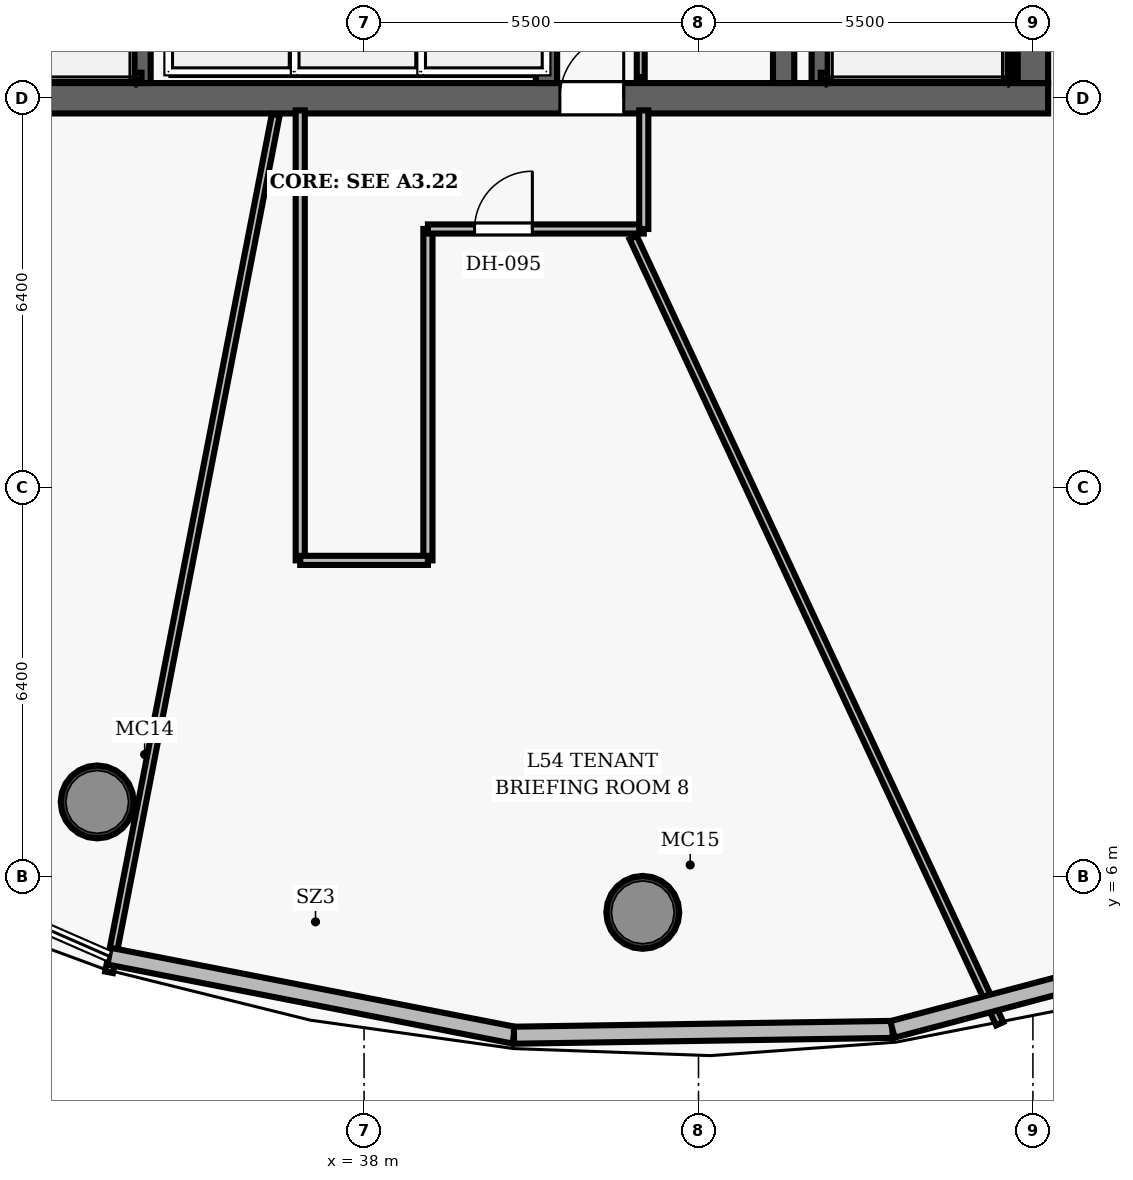
"""IFC4 building model, lengths in metres.
Left out: names, types, materials, properties, quantities, classifications, styles, units other than length and angle.
Written with IfcOpenShell. Run it as: python <this file> out.ifc"""

import sys

from ifc_helpers import new_model, si_unit, direction, frame, frame_2d, origin, origin_2d, place, context, subcontext, project, spatial, rectangle, hollow_circle, extrude, element, fill, save


model = new_model("IFC4")
c1 = context("Model", 3, precision=1e-05, world=origin(), true_north=direction((0.0, 1.0)))
c2 = subcontext(c1, "Body", "Model", "MODEL_VIEW")
j1 = project(units=[si_unit("LENGTHUNIT", "METRE"), si_unit("PLANEANGLEUNIT", "RADIAN")], contexts=[c1])
p1 = place(None, origin())
s1 = spatial("IfcSite", under=j1, at=p1, CompositionType="ELEMENT")
p2 = place(p1, origin())
s2 = spatial("IfcBuilding", under=s1, at=p2, CompositionType="ELEMENT")
p3 = place(p2, frame((0.0, 0.0, 213.55)))
s3 = spatial("IfcBuildingStorey", under=s2, at=p3, CompositionType="ELEMENT", Elevation=213.55)
p4 = place(p3, frame((26.75, 18.8, 0.0), z_axis=(0.0, 0.0, 1.0), x_axis=(1.0, 0.0, 0.0)))
e1 = element("IfcWall", 1, at=p4, inside=s3, PredefinedType="SHEAR", context=c2, shape_type="SweptSolid", body=[
    extrude(rectangle(XDim=22.5, YDim=0.5, at=frame_2d((11.25, 0.0))), origin(), (0.0, 0.0, 1.0), 3.85),
])
p5 = place(p4, frame((14.47, 0.0, 0.0)))
e2 = element("IfcOpeningElement", 2, at=p5, cuts=e1, PredefinedType="OPENING", context=c2, shape_type="SweptSolid", body=[
    extrude(rectangle(XDim=1.05, YDim=2.15, at=frame_2d((0.525, 1.075))), frame((0.0, 0.26, 0.0), z_axis=(0.0, -1.0, 0.0), x_axis=(1.0, 0.0, 0.0)), (0.0, 0.0, 1.0), 0.52),
])
p6 = place(p3, frame((49.0, 19.05, 0.0), z_axis=(0.0, 0.0, 1.0), x_axis=(0.0, 1.0, 0.0)))
e3 = element("IfcWall", 3, at=p6, inside=s3, PredefinedType="SHEAR", context=c2, shape_type="SweptSolid", body=[
    extrude(rectangle(XDim=13.9, YDim=0.5, at=frame_2d((6.95, 0.0))), origin(), (0.0, 0.0, 1.0), 3.85),
])
p7 = place(p6, frame((8.2, 0.0, 0.0)))
e4 = element("IfcOpeningElement", 4, at=p7, cuts=e3, PredefinedType="OPENING", context=c2, shape_type="SweptSolid", body=[
    extrude(rectangle(XDim=1.05, YDim=2.15, at=frame_2d((0.525, 1.075))), frame((0.0, 0.26, 0.0), z_axis=(0.0, -1.0, 0.0), x_axis=(1.0, 0.0, 0.0)), (0.0, 0.0, 1.0), 0.52),
])
p8 = place(p3, frame((44.9, 19.05, 0.0), z_axis=(0.0, 0.0, 1.0), x_axis=(0.0, 1.0, 0.0)))
e5 = element("IfcWall", 5, at=p8, inside=s3, PredefinedType="SHEAR", context=c2, shape_type="SweptSolid", body=[
    extrude(rectangle(XDim=13.9, YDim=0.35, at=frame_2d((6.95, 0.0))), origin(), (0.0, 0.0, 1.0), 3.85),
])
for number, where, z_axis, x_axis in (
    (6, (33.611, 7.228, 0.0), (0.0, 0.0, 1.0), (1.0, 0.0, 0.0)),
    (7, (42.584, 5.412, 0.0), (0.0, 0.0, 1.0), (1.0, 0.0, 0.0)),
):
    element("IfcColumn", number, at=place(p3, frame(where, z_axis=z_axis, x_axis=x_axis)), inside=s3, PredefinedType="COLUMN", context=c2, shape_type="SweptSolid", body=[
        extrude(hollow_circle(Radius=0.6, WallThickness=0.05, at=origin_2d()), origin(), (0.0, 0.0, 1.0), 3.85),
    ])
p9 = place(p3, frame((45.51, 19.05, 0.0), z_axis=(0.0, 0.0, 1.0), x_axis=(0.0, 1.0, 0.0)))
e8 = element("IfcWall", 8, at=p9, inside=s3, PredefinedType="SHEAR", context=c2, shape_type="SweptSolid", body=[
    extrude(rectangle(XDim=7.5, YDim=0.3, at=frame_2d((3.75, 0.0))), origin(), (0.0, 0.0, 1.0), 3.85),
])
p10 = place(p3, frame((48.605, 19.1, 0.0), z_axis=(0.0, 0.0, 1.0), x_axis=(0.0, 1.0, 0.0)))
e9 = element("IfcWall", 9, at=p10, inside=s3, PredefinedType="SHEAR", context=c2, shape_type="SweptSolid", body=[
    extrude(rectangle(XDim=7.45, YDim=0.12, at=frame_2d((3.725, 0.0))), origin(), (0.0, 0.0, 1.0), 3.85),
])
p11 = place(p3, frame((45.51, 19.16, 0.0), z_axis=(0.0, 0.0, 1.0), x_axis=(1.0, 0.0, 0.0)))
e10 = element("IfcWall", 10, at=p11, inside=s3, PredefinedType="SHEAR", context=c2, shape_type="SweptSolid", body=[
    extrude(rectangle(XDim=3.095, YDim=0.12, at=frame_2d((1.547, 0.0))), origin(), (0.0, 0.0, 1.0), 3.85),
])
p12 = place(p3, frame((34.34, 19.05, 0.0), z_axis=(0.0, 0.0, 1.0), x_axis=(0.0, 1.0, 0.0)))
e11 = element("IfcWall", 11, at=p12, inside=s3, PredefinedType="SHEAR", context=c2, shape_type="SweptSolid", body=[
    extrude(rectangle(XDim=7.5, YDim=0.3, at=frame_2d((3.75, 0.0))), origin(), (0.0, 0.0, 1.0), 3.85),
])
p13 = place(p3, frame((31.3, 19.16, 0.0), z_axis=(0.0, 0.0, 1.0), x_axis=(1.0, 0.0, 0.0)))
e12 = element("IfcWall", 12, at=p13, inside=s3, PredefinedType="SHEAR", context=c2, shape_type="SweptSolid", body=[
    extrude(rectangle(XDim=3.04, YDim=0.12, at=frame_2d((1.52, 0.0))), origin(), (0.0, 0.0, 1.0), 3.85),
])
p14 = place(p3, frame((41.0, 19.05, 0.0), z_axis=(0.0, 0.0, 1.0), x_axis=(0.0, 1.0, 0.0)))
e13 = element("IfcWall", 13, at=p14, inside=s3, PredefinedType="SHEAR", context=c2, shape_type="SweptSolid", body=[
    extrude(rectangle(XDim=2.08, YDim=0.35, at=frame_2d((1.04, 0.0))), origin(), (0.0, 0.0, 1.0), 3.035),
])
p15 = place(p3, frame((42.55, 19.15, 0.0), z_axis=(0.0, 0.0, 1.0), x_axis=(0.0, 1.0, 0.0)))
e14 = element("IfcWall", 14, at=p15, inside=s3, PredefinedType="PARTITIONING", context=c2, shape_type="SweptSolid", body=[
    extrude(rectangle(XDim=2.75, YDim=0.13, at=frame_2d((1.375, 0.0))), origin(), (0.0, 0.0, 1.0), 3.035),
])
p16 = place(p15, frame((0.65, 0.0, 0.0)))
e15 = element("IfcOpeningElement", 15, at=p16, cuts=e14, PredefinedType="OPENING", context=c2, shape_type="SweptSolid", body=[
    extrude(rectangle(XDim=0.85, YDim=2.1, at=frame_2d((0.425, 1.05))), frame((0.0, 0.075, 0.0), z_axis=(0.0, -1.0, 0.0), x_axis=(1.0, 0.0, 0.0)), (0.0, 0.0, 1.0), 0.15),
])
p17 = place(p3, frame((36.95, 11.2, 0.0), z_axis=(0.0, 0.0, 1.0), x_axis=(0.0, 1.0, 0.0)))
e16 = element("IfcWall", 16, at=p17, inside=s3, PredefinedType="PARTITIONING", context=c2, shape_type="SweptSolid", body=[
    extrude(rectangle(XDim=7.4, YDim=0.15, at=frame_2d((3.7, 0.0))), origin(), (0.0, 0.0, 1.0), 3.035),
])
p18 = place(p3, frame((39.05, 11.2, 0.0), z_axis=(0.0, 0.0, 1.0), x_axis=(0.0, 1.0, 0.0)))
e17 = element("IfcWall", 17, at=p18, inside=s3, PredefinedType="PARTITIONING", context=c2, shape_type="SweptSolid", body=[
    extrude(rectangle(XDim=5.45, YDim=0.15, at=frame_2d((2.725, 0.0))), origin(), (0.0, 0.0, 1.0), 3.035),
])
p19 = place(p3, frame((39.05, 16.65, 0.0), z_axis=(0.0, 0.0, 1.0), x_axis=(1.0, 0.0, 0.0)))
e18 = element("IfcWall", 18, at=p19, inside=s3, PredefinedType="PARTITIONING", context=c2, shape_type="SweptSolid", body=[
    extrude(rectangle(XDim=3.55, YDim=0.15, at=frame_2d((1.775, 0.0))), origin(), (0.0, 0.0, 1.0), 3.035),
])
p20 = place(p19, frame((0.768, 0.0, 0.0)))
e19 = element("IfcOpeningElement", 19, at=p20, cuts=e18, PredefinedType="OPENING", context=c2, shape_type="SweptSolid", body=[
    extrude(rectangle(XDim=0.95, YDim=2.15, at=frame_2d((0.475, 1.075))), frame((0.0, 0.085, 0.0), z_axis=(0.0, -1.0, 0.0), x_axis=(1.0, 0.0, 0.0)), (0.0, 0.0, 1.0), 0.17),
])
p21 = place(p3, frame((42.6, 16.65, 0.0), z_axis=(0.0, 0.0, 1.0), x_axis=(0.0, 1.0, 0.0)))
e20 = element("IfcWall", 20, at=p21, inside=s3, PredefinedType="PARTITIONING", context=c2, shape_type="SweptSolid", body=[
    extrude(rectangle(XDim=1.95, YDim=0.15, at=frame_2d((0.975, 0.0))), origin(), (0.0, 0.0, 1.0), 3.035),
])
p22 = place(p3, frame((36.95, 11.2, 0.0), z_axis=(0.0, 0.0, 1.0), x_axis=(1.0, 0.0, 0.0)))
e21 = element("IfcWall", 21, at=p22, inside=s3, PredefinedType="PARTITIONING", context=c2, shape_type="SweptSolid", body=[
    extrude(rectangle(XDim=2.1, YDim=0.15, at=frame_2d((1.05, 0.0))), origin(), (0.0, 0.0, 1.0), 3.035),
])
p23 = place(p3, frame((36.548, 18.53, 0.0), z_axis=(0.0, 0.0, 1.0), x_axis=(-0.190822813374, -0.9816244974, 0.0)))
e22 = element("IfcWall", 22, at=p23, inside=s3, PredefinedType="PARTITIONING", context=c2, shape_type="SweptSolid", body=[
    extrude(rectangle(XDim=14.368, YDim=0.13, at=frame_2d((7.184, 0.0))), origin(), (0.0, 0.0, 1.0), 3.035),
])
p24 = place(p3, frame((42.425, 16.51, 0.0), z_axis=(0.0, 0.0, 1.0), x_axis=(0.422623131255, -0.906305516329, 0.0)))
e23 = element("IfcWall", 23, at=p24, inside=s3, PredefinedType="PARTITIONING", context=c2, shape_type="SweptSolid", body=[
    extrude(rectangle(XDim=14.266, YDim=0.13, at=frame_2d((7.133, 0.0))), origin(), (0.0, 0.0, 1.0), 3.035),
])
p25 = place(p3, frame((49.27, 19.753, 0.0), z_axis=(0.0, 0.0, 1.0), x_axis=(0.874618736084, -0.484811372072, 0.0)))
e24 = element("IfcWall", 24, at=p25, inside=s3, PredefinedType="PARTITIONING", context=c2, shape_type="SweptSolid", body=[
    extrude(rectangle(XDim=12.168, YDim=0.13, at=frame_2d((6.084, 0.0))), origin(), (0.0, 0.0, 1.0), 3.035),
])
p26 = place(p3, frame((40.465, 3.392, 0.0), z_axis=(0.0, 0.0, 1.0), x_axis=(-0.981475410998, 0.191588145786, 0.0)))
e25 = element("IfcWall", 25, at=p26, inside=s3, PredefinedType="SOLIDWALL", context=c2, shape_type="SweptSolid", body=[
    extrude(rectangle(XDim=6.784, YDim=0.28, at=frame_2d((3.392, 0.0))), origin(), (0.0, 0.0, 1.0), 3.62),
])
p27 = place(p3, frame((46.69, 3.487, 0.0), z_axis=(0.0, 0.0, 1.0), x_axis=(-0.999882465169, -0.015331531133, 0.0)))
e26 = element("IfcWall", 26, at=p27, inside=s3, PredefinedType="SOLIDWALL", context=c2, shape_type="SweptSolid", body=[
    extrude(rectangle(XDim=6.226, YDim=0.28, at=frame_2d((3.113, 0.0))), origin(), (0.0, 0.0, 1.0), 3.62),
])
p28 = place(p3, frame((51.973, 4.887, 0.0), z_axis=(0.0, 0.0, 1.0), x_axis=(-0.966618709205, -0.256219185491, 0.0)))
e27 = element("IfcWall", 27, at=p28, inside=s3, PredefinedType="SOLIDWALL", context=c2, shape_type="SweptSolid", body=[
    extrude(rectangle(XDim=5.465, YDim=0.28, at=frame_2d((2.732, 0.0))), origin(), (0.0, 0.0, 1.0), 3.62),
])
p29 = place(p5, origin())
e28 = element("IfcDoor", 28, at=p29, inside=s3, OperationType="SINGLE_SWING_RIGHT", PredefinedType="DOOR", context=c2, shape_type="SweptSolid", body=[
    extrude(rectangle(XDim=1.05, YDim=2.15, at=frame_2d((0.525, 1.075))), frame((0.0, 0.025, 0.0), z_axis=(0.0, -1.0, 0.0), x_axis=(1.0, 0.0, 0.0)), (0.0, 0.0, 1.0), 0.05),
])
fill(e2, e28)
p30 = place(p20, origin())
e29 = element("IfcDoor", 29, at=p30, inside=s3, OperationType="SINGLE_SWING_RIGHT", PredefinedType="DOOR", context=c2, shape_type="SweptSolid", body=[
    extrude(rectangle(XDim=0.95, YDim=2.15, at=frame_2d((0.475, 1.075))), frame((0.0, 0.025, 0.0), z_axis=(0.0, -1.0, 0.0), x_axis=(1.0, 0.0, 0.0)), (0.0, 0.0, 1.0), 0.05),
])
fill(e19, e29)
save(model, sys.argv[1])
